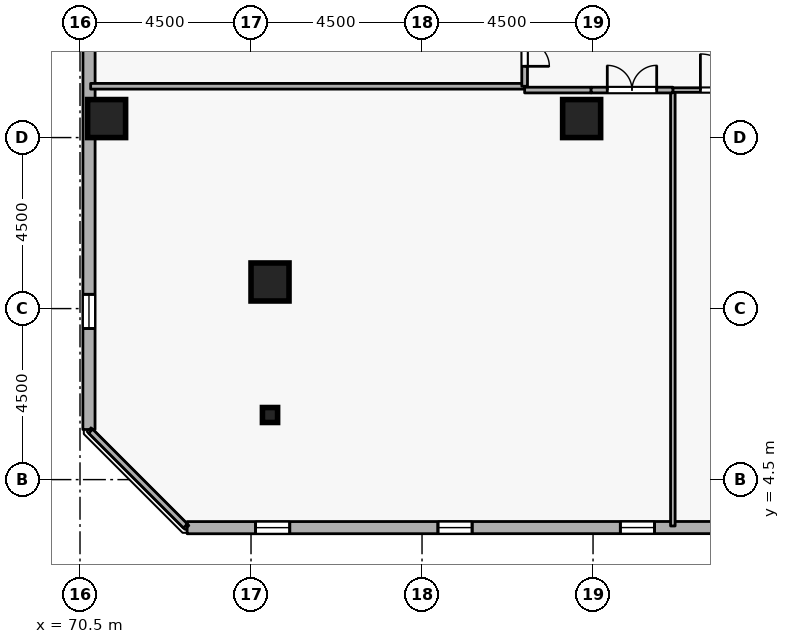
"""IFC4 building model, lengths in metres.
Left out: names, types, materials, properties, quantities, classifications, styles, units other than length and angle.
Written with IfcOpenShell. Run it as: python <this file> out.ifc"""

import sys

from ifc_helpers import new_model, si_unit, direction, frame, frame_2d, origin, origin_2d, place, context, subcontext, project, spatial, rectangle, i_section, extrude, element, fill, save


model = new_model("IFC4")
c1 = context("Model", 3, precision=1e-05, world=origin(), true_north=direction((0.0, 1.0)))
c2 = subcontext(c1, "Body", "Model", "MODEL_VIEW")
j1 = project(units=[si_unit("LENGTHUNIT", "METRE"), si_unit("PLANEANGLEUNIT", "RADIAN")], contexts=[c1])
p1 = place(None, origin())
s1 = spatial("IfcSite", under=j1, at=p1, CompositionType="ELEMENT")
p2 = place(p1, origin())
s2 = spatial("IfcBuilding", under=s1, at=p2, CompositionType="ELEMENT")
p3 = place(p2, frame((0.0, 0.0, 247.5)))
s3 = spatial("IfcBuildingStorey", under=s2, at=p3, CompositionType="ELEMENT", Elevation=247.5)
for number, where, z_axis, x_axis in (
    (1, (71.2, 14.0, 0.0), (0.0, 0.0, 1.0), (1.0, 0.0, 0.0)),
    (2, (75.5, 9.7, 0.0), (0.0, 0.0, 1.0), (1.0, 0.0, 0.0)),
    (3, (83.7, 14.0, 0.0), (0.0, 0.0, 1.0), (1.0, 0.0, 0.0)),
):
    element("IfcColumn", number, at=place(p3, frame(where, z_axis=z_axis, x_axis=x_axis)), inside=s3, PredefinedType="COLUMN", context=c2, shape_type="SweptSolid", body=[
        extrude(rectangle(XDim=1.0, YDim=1.0, at=origin_2d()), origin(), (0.0, 0.0, 1.0), 3.6),
    ])
p4 = place(p3, frame((75.5, 6.2, 0.0), z_axis=(0.0, 0.0, 1.0), x_axis=(1.0, 0.0, 0.0)))
e4 = element("IfcColumn", 4, at=p4, inside=s3, PredefinedType="COLUMN", context=c2, shape_type="SweptSolid", body=[
    extrude(i_section(OverallWidth=0.399, OverallDepth=0.394, WebThickness=0.023, FlangeThickness=0.037, FilletRadius=0.015, at=origin_2d()), origin(), (0.0, 0.0, 1.0), 3.6),
])
p5 = place(p3, frame((73.319, 3.235, 0.0), z_axis=(0.0, 0.0, 1.0), x_axis=(0.99999997701, 0.000214431216, 0.0)))
e5 = element("IfcWall", 5, at=p5, inside=s3, PredefinedType="STANDARD", context=c2, shape_type="SweptSolid", body=[
    extrude(rectangle(XDim=34.156, YDim=0.32, at=frame_2d((17.078, 0.0))), origin(), (0.0, 0.0, 1.0), 2.7),
])
p6 = place(p5, frame((1.8, 0.0, 0.72)))
e6 = element("IfcOpeningElement", 6, at=p6, cuts=e5, PredefinedType="OPENING", context=c2, shape_type="SweptSolid", body=[
    extrude(rectangle(XDim=0.9, YDim=1.75, at=frame_2d((0.45, 0.875))), frame((0.0, 0.17, 0.0), z_axis=(0.0, -1.0, 0.0), x_axis=(1.0, 0.0, 0.0)), (0.0, 0.0, 1.0), 0.34),
])
p7 = place(p5, frame((6.6, 0.0, 0.72)))
e7 = element("IfcOpeningElement", 7, at=p7, cuts=e5, PredefinedType="OPENING", context=c2, shape_type="SweptSolid", body=[
    extrude(rectangle(XDim=0.9, YDim=1.75, at=frame_2d((0.45, 0.875))), frame((0.0, 0.17, 0.0), z_axis=(0.0, -1.0, 0.0), x_axis=(1.0, 0.0, 0.0)), (0.0, 0.0, 1.0), 0.34),
])
p8 = place(p5, frame((11.4, 0.0, 0.72)))
e8 = element("IfcOpeningElement", 8, at=p8, cuts=e5, PredefinedType="OPENING", context=c2, shape_type="SweptSolid", body=[
    extrude(rectangle(XDim=0.9, YDim=1.75, at=frame_2d((0.45, 0.875))), frame((0.0, 0.17, 0.0), z_axis=(0.0, -1.0, 0.0), x_axis=(1.0, 0.0, 0.0)), (0.0, 0.0, 1.0), 0.34),
])
p9 = place(p5, frame((16.2, 0.0, 0.72)))
e9 = element("IfcOpeningElement", 9, at=p9, cuts=e5, PredefinedType="OPENING", context=c2, shape_type="SweptSolid", body=[
    extrude(rectangle(XDim=0.9, YDim=1.75, at=frame_2d((0.45, 0.875))), frame((0.0, 0.17, 0.0), z_axis=(0.0, -1.0, 0.0), x_axis=(1.0, 0.0, 0.0)), (0.0, 0.0, 1.0), 0.34),
])
p10 = place(p5, frame((21.0, 0.0, 0.72)))
e10 = element("IfcOpeningElement", 10, at=p10, cuts=e5, PredefinedType="OPENING", context=c2, shape_type="SweptSolid", body=[
    extrude(rectangle(XDim=0.9, YDim=1.75, at=frame_2d((0.45, 0.875))), frame((0.0, 0.17, 0.0), z_axis=(0.0, -1.0, 0.0), x_axis=(1.0, 0.0, 0.0)), (0.0, 0.0, 1.0), 0.34),
])
p11 = place(p5, frame((25.8, 0.0, 0.72)))
e11 = element("IfcOpeningElement", 11, at=p11, cuts=e5, PredefinedType="OPENING", context=c2, shape_type="SweptSolid", body=[
    extrude(rectangle(XDim=0.9, YDim=1.75, at=frame_2d((0.45, 0.875))), frame((0.0, 0.17, 0.0), z_axis=(0.0, -1.0, 0.0), x_axis=(1.0, 0.0, 0.0)), (0.0, 0.0, 1.0), 0.34),
])
p12 = place(p5, frame((30.6, 0.0, 0.72)))
e12 = element("IfcOpeningElement", 12, at=p12, cuts=e5, PredefinedType="OPENING", context=c2, shape_type="SweptSolid", body=[
    extrude(rectangle(XDim=0.9, YDim=1.75, at=frame_2d((0.45, 0.875))), frame((0.0, 0.17, 0.0), z_axis=(0.0, -1.0, 0.0), x_axis=(1.0, 0.0, 0.0)), (0.0, 0.0, 1.0), 0.34),
])
p13 = place(p3, frame((70.743, 39.975, 0.0), z_axis=(0.0, 0.0, 1.0), x_axis=(-0.000214431216, -0.99999997701, 0.0)))
e13 = element("IfcWall", 13, at=p13, inside=s3, PredefinedType="STANDARD", context=c2, shape_type="SweptSolid", body=[
    extrude(rectangle(XDim=34.156, YDim=0.32, at=frame_2d((17.078, 0.0))), origin(), (0.0, 0.0, 1.0), 2.7),
])
p14 = place(p13, frame((6.6, 0.0, 0.72)))
e14 = element("IfcOpeningElement", 14, at=p14, cuts=e13, PredefinedType="OPENING", context=c2, shape_type="SweptSolid", body=[
    extrude(rectangle(XDim=0.9, YDim=1.75, at=frame_2d((0.45, 0.875))), frame((0.0, 0.17, 0.0), z_axis=(0.0, -1.0, 0.0), x_axis=(1.0, 0.0, 0.0)), (0.0, 0.0, 1.0), 0.34),
])
p15 = place(p13, frame((16.2, 0.0, 0.72)))
e15 = element("IfcOpeningElement", 15, at=p15, cuts=e13, PredefinedType="OPENING", context=c2, shape_type="SweptSolid", body=[
    extrude(rectangle(XDim=0.9, YDim=1.75, at=frame_2d((0.45, 0.875))), frame((0.0, 0.17, 0.0), z_axis=(0.0, -1.0, 0.0), x_axis=(1.0, 0.0, 0.0)), (0.0, 0.0, 1.0), 0.34),
])
p16 = place(p13, frame((21.0, 0.0, 0.72)))
e16 = element("IfcOpeningElement", 16, at=p16, cuts=e13, PredefinedType="OPENING", context=c2, shape_type="SweptSolid", body=[
    extrude(rectangle(XDim=0.9, YDim=1.75, at=frame_2d((0.45, 0.875))), frame((0.0, 0.17, 0.0), z_axis=(0.0, -1.0, 0.0), x_axis=(1.0, 0.0, 0.0)), (0.0, 0.0, 1.0), 0.34),
])
p17 = place(p13, frame((30.6, 0.0, 0.72)))
e17 = element("IfcOpeningElement", 17, at=p17, cuts=e13, PredefinedType="OPENING", context=c2, shape_type="SweptSolid", body=[
    extrude(rectangle(XDim=0.9, YDim=1.75, at=frame_2d((0.45, 0.875))), frame((0.0, 0.17, 0.0), z_axis=(0.0, -1.0, 0.0), x_axis=(1.0, 0.0, 0.0)), (0.0, 0.0, 1.0), 0.34),
])
p18 = place(p3, frame((82.2, 14.85, 0.0), z_axis=(0.0, 0.0, 1.0), x_axis=(-1.0, 0.0, 0.0)))
e18 = element("IfcWall", 18, at=p18, inside=s3, PredefinedType="PARTITIONING", context=c2, shape_type="SweptSolid", body=[
    extrude(rectangle(XDim=11.42, YDim=0.15, at=frame_2d((5.71, 0.0))), origin(), (0.0, 0.0, 1.0), 3.34),
])
p19 = place(p3, frame((82.2, 17.2, 0.0), z_axis=(0.0, 0.0, 1.0), x_axis=(0.0, -1.0, 0.0)))
e19 = element("IfcWall", 19, at=p19, inside=s3, PredefinedType="PARTITIONING", context=c2, shape_type="SweptSolid", body=[
    extrude(rectangle(XDim=2.35, YDim=0.15, at=frame_2d((1.175, 0.0))), origin(), (0.0, 0.0, 1.0), 3.34),
])
p20 = place(p19, frame((0.525, 0.0, 0.0)))
e20 = element("IfcOpeningElement", 20, at=p20, cuts=e19, PredefinedType="OPENING", context=c2, shape_type="SweptSolid", body=[
    extrude(rectangle(XDim=1.3, YDim=2.12, at=frame_2d((0.65, 1.06))), frame((0.0, 0.085, 0.0), z_axis=(0.0, -1.0, 0.0), x_axis=(1.0, 0.0, 0.0)), (0.0, 0.0, 1.0), 0.17),
])
p21 = place(p3, frame((86.1, 3.28, 0.0), z_axis=(0.0, 0.0, 1.0), x_axis=(0.0, 1.0, 0.0)))
e21 = element("IfcWall", 21, at=p21, inside=s3, PredefinedType="PARTITIONING", context=c2, shape_type="SweptSolid", body=[
    extrude(rectangle(XDim=11.47, YDim=0.12, at=frame_2d((5.735, 0.0))), origin(), (0.0, 0.0, 1.0), 3.34),
])
p22 = place(p3, frame((86.1, 14.75, 0.0), z_axis=(0.0, 0.0, 1.0), x_axis=(1.0, 0.0, 0.0)))
e22 = element("IfcWall", 22, at=p22, inside=s3, PredefinedType="PARTITIONING", context=c2, shape_type="SweptSolid", body=[
    extrude(rectangle(XDim=2.4, YDim=0.12, at=frame_2d((1.2, 0.0))), origin(), (0.0, 0.0, 1.0), 3.34),
])
p23 = place(p22, frame((0.725, 0.0, 0.0)))
e23 = element("IfcOpeningElement", 23, at=p23, cuts=e22, PredefinedType="OPENING", context=c2, shape_type="SweptSolid", body=[
    extrude(rectangle(XDim=0.95, YDim=2.1, at=frame_2d((0.475, 1.05))), frame((0.0, 0.07, 0.0), z_axis=(0.0, -1.0, 0.0), x_axis=(1.0, 0.0, 0.0)), (0.0, 0.0, 1.0), 0.14),
])
p24 = place(p3, frame((73.275, 3.28, 0.0), z_axis=(0.0, 0.0, 1.0), x_axis=(-0.707106781187, 0.707106781187, 0.0)))
e24 = element("IfcWall", 24, at=p24, inside=s3, PredefinedType="PARTITIONING", context=c2, shape_type="SweptSolid", body=[
    extrude(rectangle(XDim=3.528, YDim=0.15, at=frame_2d((1.764, 0.0))), origin(), (0.0, 0.0, 1.0), 3.34),
])
p25 = place(p3, frame((82.2, 14.75, 0.0), z_axis=(0.0, 0.0, 1.0), x_axis=(1.0, 0.0, 0.0)))
e25 = element("IfcWall", 25, at=p25, inside=s3, PredefinedType="PARTITIONING", context=c2, shape_type="SweptSolid", body=[
    extrude(rectangle(XDim=1.75, YDim=0.15, at=frame_2d((0.875, 0.0))), origin(), (0.0, 0.0, 1.0), 3.34),
])
p26 = place(p3, frame((83.95, 14.75, 0.0), z_axis=(0.0, 0.0, 1.0), x_axis=(1.0, 0.0, 0.0)))
e26 = element("IfcWall", 26, at=p26, inside=s3, PredefinedType="PARTITIONING", context=c2, shape_type="SweptSolid", body=[
    extrude(rectangle(XDim=2.15, YDim=0.15, at=frame_2d((1.075, 0.0))), origin(), (0.0, 0.0, 1.0), 3.34),
])
p27 = place(p26, frame((0.425, 0.0, 0.0)))
e27 = element("IfcOpeningElement", 27, at=p27, cuts=e26, PredefinedType="OPENING", context=c2, shape_type="SweptSolid", body=[
    extrude(rectangle(XDim=1.3, YDim=2.12, at=frame_2d((0.65, 1.06))), frame((0.0, 0.085, 0.0), z_axis=(0.0, -1.0, 0.0), x_axis=(1.0, 0.0, 0.0)), (0.0, 0.0, 1.0), 0.17),
])
p28 = place(p6, origin())
e28 = element("IfcWindow", 28, at=p28, inside=s3, PartitioningType="SINGLE_PANEL", PredefinedType="WINDOW", context=c2, shape_type="SweptSolid", body=[
    extrude(rectangle(XDim=0.9, YDim=1.75, at=frame_2d((0.45, 0.875))), frame((0.0, 0.03, 0.0), z_axis=(0.0, -1.0, 0.0), x_axis=(1.0, 0.0, 0.0)), (0.0, 0.0, 1.0), 0.06),
])
fill(e6, e28)
p29 = place(p7, origin())
e29 = element("IfcWindow", 29, at=p29, inside=s3, PartitioningType="SINGLE_PANEL", PredefinedType="WINDOW", context=c2, shape_type="SweptSolid", body=[
    extrude(rectangle(XDim=0.9, YDim=1.75, at=frame_2d((0.45, 0.875))), frame((0.0, 0.03, 0.0), z_axis=(0.0, -1.0, 0.0), x_axis=(1.0, 0.0, 0.0)), (0.0, 0.0, 1.0), 0.06),
])
fill(e7, e29)
p30 = place(p8, origin())
e30 = element("IfcWindow", 30, at=p30, inside=s3, PartitioningType="SINGLE_PANEL", PredefinedType="WINDOW", context=c2, shape_type="SweptSolid", body=[
    extrude(rectangle(XDim=0.9, YDim=1.75, at=frame_2d((0.45, 0.875))), frame((0.0, 0.03, 0.0), z_axis=(0.0, -1.0, 0.0), x_axis=(1.0, 0.0, 0.0)), (0.0, 0.0, 1.0), 0.06),
])
fill(e8, e30)
p31 = place(p17, origin())
e31 = element("IfcWindow", 31, at=p31, inside=s3, PartitioningType="SINGLE_PANEL", PredefinedType="WINDOW", context=c2, shape_type="SweptSolid", body=[
    extrude(rectangle(XDim=0.9, YDim=1.75, at=frame_2d((0.45, 0.875))), frame((0.0, 0.03, 0.0), z_axis=(0.0, -1.0, 0.0), x_axis=(1.0, 0.0, 0.0)), (0.0, 0.0, 1.0), 0.06),
])
fill(e17, e31)
p32 = place(p20, origin())
e32 = element("IfcDoor", 32, at=p32, inside=s3, OperationType="DOUBLE_DOOR_SINGLE_SWING", PredefinedType="DOOR", context=c2, shape_type="SweptSolid", body=[
    extrude(rectangle(XDim=1.3, YDim=2.12, at=frame_2d((0.65, 1.06))), frame((0.0, 0.025, 0.0), z_axis=(0.0, -1.0, 0.0), x_axis=(1.0, 0.0, 0.0)), (0.0, 0.0, 1.0), 0.05),
])
fill(e20, e32)
p33 = place(p23, origin())
e33 = element("IfcDoor", 33, at=p33, inside=s3, OperationType="SINGLE_SWING_LEFT", PredefinedType="DOOR", context=c2, shape_type="SweptSolid", body=[
    extrude(rectangle(XDim=0.95, YDim=2.1, at=frame_2d((0.475, 1.05))), frame((0.0, 0.025, 0.0), z_axis=(0.0, -1.0, 0.0), x_axis=(1.0, 0.0, 0.0)), (0.0, 0.0, 1.0), 0.05),
])
fill(e23, e33)
p34 = place(p27, origin())
e34 = element("IfcDoor", 34, at=p34, inside=s3, OperationType="DOUBLE_DOOR_SINGLE_SWING", PredefinedType="DOOR", context=c2, shape_type="SweptSolid", body=[
    extrude(rectangle(XDim=1.3, YDim=2.12, at=frame_2d((0.65, 1.06))), frame((0.0, 0.025, 0.0), z_axis=(0.0, -1.0, 0.0), x_axis=(1.0, 0.0, 0.0)), (0.0, 0.0, 1.0), 0.05),
])
fill(e27, e34)
save(model, sys.argv[1])
